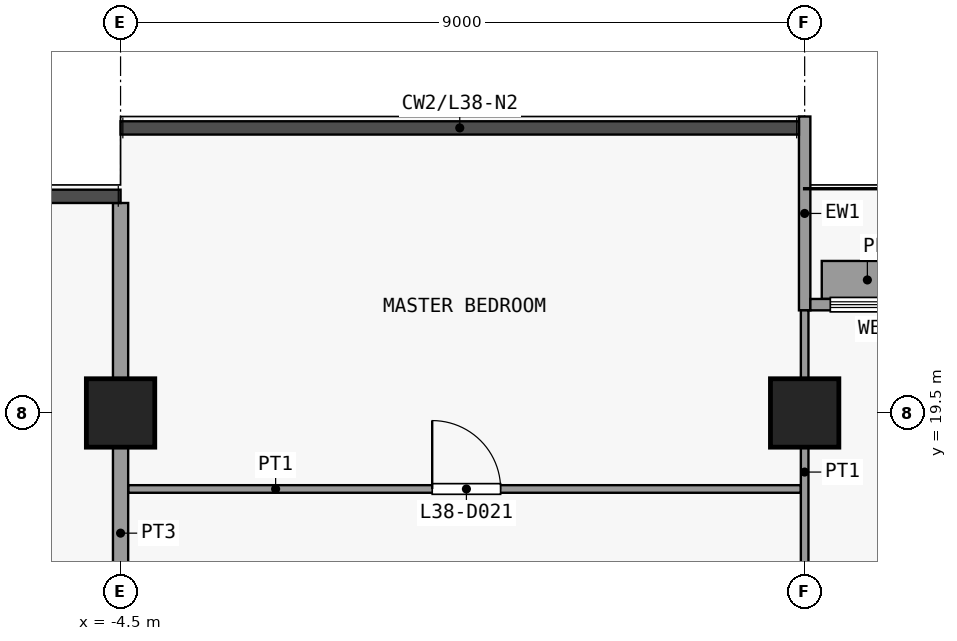
"""IFC4 building model, lengths in metres.
Left out: names, types, materials, properties, quantities, classifications, styles, units other than length and angle.
Written with IfcOpenShell. Run it as: python <this file> out.ifc"""

import sys

from ifc_helpers import new_model, si_unit, direction, frame, frame_2d, origin, origin_2d, place, context, subcontext, project, spatial, rectangle, extrude, element, fill, save


model = new_model("IFC4")
c1 = context("Model", 3, precision=1e-05, world=origin(), true_north=direction((0.0, 1.0)))
c2 = subcontext(c1, "Body", "Model", "MODEL_VIEW")
j1 = project(units=[si_unit("LENGTHUNIT", "METRE"), si_unit("PLANEANGLEUNIT", "RADIAN")], contexts=[c1])
p1 = place(None, origin())
s1 = spatial("IfcSite", under=j1, at=p1, CompositionType="ELEMENT")
p2 = place(p1, origin())
s2 = spatial("IfcBuilding", under=s1, at=p2, CompositionType="ELEMENT")
p3 = place(p2, frame((0.0, 0.0, 156.5)))
s3 = spatial("IfcBuildingStorey", under=s2, at=p3, CompositionType="ELEMENT", Elevation=156.5)
for number, where, z_axis, x_axis in (
    (1, (-4.5, 19.5, 0.0), (0.0, 0.0, 1.0), (1.0, 0.0, 0.0)),
    (2, (4.5, 19.5, 0.0), (0.0, 0.0, 1.0), (1.0, 0.0, 0.0)),
):
    element("IfcColumn", number, at=place(p3, frame(where, z_axis=z_axis, x_axis=x_axis)), inside=s3, PredefinedType="COLUMN", context=c2, shape_type="SweptSolid", body=[
        extrude(rectangle(XDim=0.9, YDim=0.9, at=origin_2d()), origin(), (0.0, 0.0, 1.0), 3.6),
    ])
p4 = place(p3, frame((4.5, 20.85, 0.0), z_axis=(0.0, 0.0, 1.0), x_axis=(0.0, 1.0, 0.0)))
e3 = element("IfcWall", 3, at=p4, inside=s3, PredefinedType="SOLIDWALL", context=c2, shape_type="SweptSolid", body=[
    extrude(rectangle(XDim=2.55, YDim=0.15, at=frame_2d((1.275, 0.0))), origin(), (0.0, 0.0, 1.0), 3.3),
])
p5 = place(p3, frame((4.575, 20.925, 0.0), z_axis=(0.0, 0.0, 1.0), x_axis=(1.0, 0.0, 0.0)))
e4 = element("IfcWall", 4, at=p5, inside=s3, PredefinedType="SOLIDWALL", context=c2, shape_type="SweptSolid", body=[
    extrude(rectangle(XDim=5.85, YDim=0.15, at=frame_2d((2.925, 0.0))), origin(), (0.0, 0.0, 1.0), 3.3),
])
p6 = place(p5, frame((2.325, 0.0, 0.0)))
e5 = element("IfcOpeningElement", 5, at=p6, cuts=e4, PredefinedType="OPENING", context=c2, shape_type="SweptSolid", body=[
    extrude(rectangle(XDim=1.2, YDim=2.4, at=frame_2d((0.6, 1.2))), frame((0.0, 0.085, 0.0), z_axis=(0.0, -1.0, 0.0), x_axis=(1.0, 0.0, 0.0)), (0.0, 0.0, 1.0), 0.17),
])
p7 = place(p5, frame((0.262, 0.0, 0.9)))
e6 = element("IfcOpeningElement", 6, at=p7, cuts=e4, PredefinedType="OPENING", context=c2, shape_type="SweptSolid", body=[
    extrude(rectangle(XDim=1.8, YDim=2.1, at=frame_2d((0.9, 1.05))), frame((0.0, 0.085, 0.0), z_axis=(0.0, -1.0, 0.0), x_axis=(1.0, 0.0, 0.0)), (0.0, 0.0, 1.0), 0.17),
])
p8 = place(p5, frame((3.788, 0.0, 0.9)))
e7 = element("IfcOpeningElement", 7, at=p8, cuts=e4, PredefinedType="OPENING", context=c2, shape_type="SweptSolid", body=[
    extrude(rectangle(XDim=1.8, YDim=2.1, at=frame_2d((0.9, 1.05))), frame((0.0, 0.085, 0.0), z_axis=(0.0, -1.0, 0.0), x_axis=(1.0, 0.0, 0.0)), (0.0, 0.0, 1.0), 0.17),
])
p9 = place(p3, frame((4.725, 21.25, 0.0), z_axis=(0.0, 0.0, 1.0), x_axis=(1.0, 0.0, 0.0)))
e8 = element("IfcWall", 8, at=p9, inside=s3, PredefinedType="USERDEFINED", context=c2, shape_type="SweptSolid", body=[
    extrude(rectangle(XDim=1.2, YDim=0.5, at=frame_2d((0.6, 0.0))), origin(), (0.0, 0.0, 1.0), 0.9),
])
p10 = place(p3, frame((-4.4, 18.5, 0.0), z_axis=(0.0, 0.0, 1.0), x_axis=(1.0, 0.0, 0.0)))
e9 = element("IfcWall", 9, at=p10, inside=s3, PredefinedType="PARTITIONING", context=c2, shape_type="SweptSolid", body=[
    extrude(rectangle(XDim=8.85, YDim=0.1, at=frame_2d((4.425, 0.0))), origin(), (0.0, 0.0, 1.0), 3.3),
])
p11 = place(p10, frame((4.0, 0.0, 0.0)))
e10 = element("IfcOpeningElement", 10, at=p11, cuts=e9, PredefinedType="OPENING", context=c2, shape_type="SweptSolid", body=[
    extrude(rectangle(XDim=0.9, YDim=2.1, at=frame_2d((0.45, 1.05))), frame((0.0, 0.06, 0.0), z_axis=(0.0, -1.0, 0.0), x_axis=(1.0, 0.0, 0.0)), (0.0, 0.0, 1.0), 0.12),
])
p12 = place(p3, frame((-4.5, 13.575, 0.0), z_axis=(0.0, 0.0, 1.0), x_axis=(0.0, 1.0, 0.0)))
e11 = element("IfcWall", 11, at=p12, inside=s3, PredefinedType="PARTITIONING", context=c2, shape_type="SweptSolid", body=[
    extrude(rectangle(XDim=8.688, YDim=0.2, at=frame_2d((4.344, 0.0))), origin(), (0.0, 0.0, 1.0), 3.3),
])
p13 = place(p3, frame((4.5, 13.575, 0.0), z_axis=(0.0, 0.0, 1.0), x_axis=(0.0, 1.0, 0.0)))
e12 = element("IfcWall", 12, at=p13, inside=s3, PredefinedType="PARTITIONING", context=c2, shape_type="SweptSolid", body=[
    extrude(rectangle(XDim=7.275, YDim=0.1, at=frame_2d((3.638, 0.0))), origin(), (0.0, 0.0, 1.0), 3.3),
])
p14 = place(p13, frame((2.0, 0.0, 0.0)))
e13 = element("IfcOpeningElement", 13, at=p14, cuts=e12, PredefinedType="OPENING", context=c2, shape_type="SweptSolid", body=[
    extrude(rectangle(XDim=0.9, YDim=2.1, at=frame_2d((0.45, 1.05))), frame((0.0, 0.06, 0.0), z_axis=(0.0, -1.0, 0.0), x_axis=(1.0, 0.0, 0.0)), (0.0, 0.0, 1.0), 0.12),
])
p15 = place(p7, origin())
e14 = element("IfcWindow", 14, at=p15, inside=s3, PartitioningType="SINGLE_PANEL", PredefinedType="WINDOW", context=c2, shape_type="SweptSolid", body=[
    extrude(rectangle(XDim=1.8, YDim=2.1, at=frame_2d((0.9, 1.05))), frame((0.0, 0.03, 0.0), z_axis=(0.0, -1.0, 0.0), x_axis=(1.0, 0.0, 0.0)), (0.0, 0.0, 1.0), 0.06),
])
fill(e6, e14)
p16 = place(p11, origin())
e15 = element("IfcDoor", 15, at=p16, inside=s3, OperationType="SINGLE_SWING_RIGHT", PredefinedType="DOOR", context=c2, shape_type="SweptSolid", body=[
    extrude(rectangle(XDim=0.9, YDim=2.1, at=frame_2d((0.45, 1.05))), frame((0.0, 0.025, 0.0), z_axis=(0.0, -1.0, 0.0), x_axis=(1.0, 0.0, 0.0)), (0.0, 0.0, 1.0), 0.05),
])
fill(e10, e15)
save(model, sys.argv[1])
